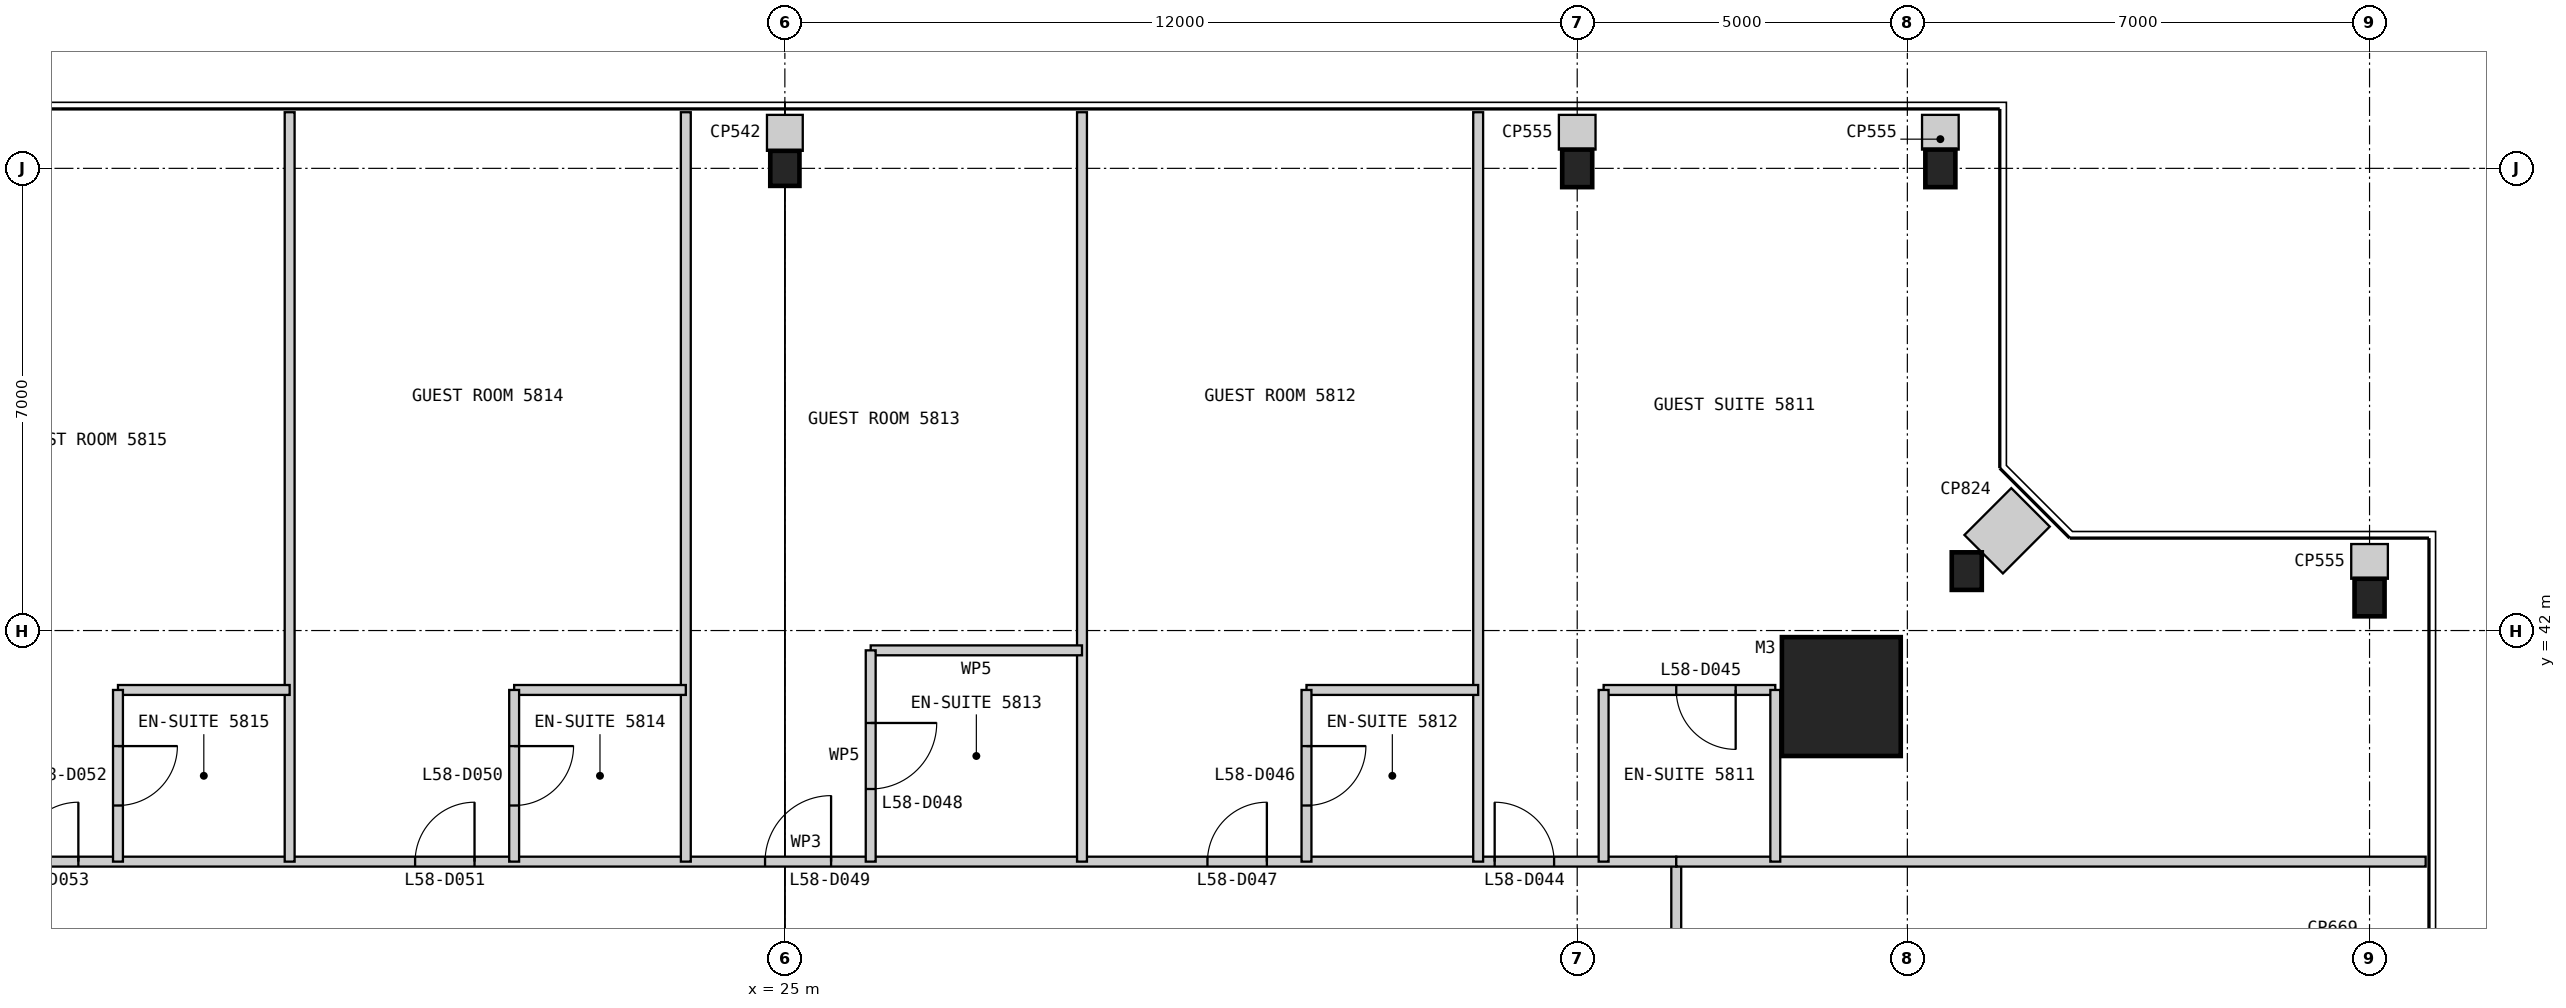
"""IFC4 building model, lengths in metres.
Left out: names, types, materials, properties, quantities, classifications, styles, units other than length and angle.
Written with IfcOpenShell. Run it as: python <this file> out.ifc"""

import sys

from ifc_helpers import new_model, si_unit, direction, frame, frame_2d, origin, origin_2d, place, context, subcontext, project, spatial, rectangle, i_section, extrude, element, fill, save


model = new_model("IFC4")
c1 = context("Model", 3, precision=1e-05, world=origin(), true_north=direction((0.0, 1.0)))
c2 = subcontext(c1, "Body", "Model", "MODEL_VIEW")
j1 = project(units=[si_unit("LENGTHUNIT", "METRE"), si_unit("PLANEANGLEUNIT", "RADIAN")], contexts=[c1])
p1 = place(None, origin())
s1 = spatial("IfcSite", under=j1, at=p1, CompositionType="ELEMENT")
p2 = place(p1, origin())
s2 = spatial("IfcBuilding", under=s1, at=p2, CompositionType="ELEMENT")
p3 = place(p2, frame((0.0, 0.0, 249.2)))
s3 = spatial("IfcBuildingStorey", under=s2, at=p3, CompositionType="ELEMENT", Elevation=249.2)
p4 = place(p3, frame((41.0, 41.0, 0.0), z_axis=(0.0, 0.0, 1.0), x_axis=(1.0, 0.0, 0.0)))
e1 = element("IfcColumn", 1, at=p4, inside=s3, PredefinedType="COLUMN", context=c2, shape_type="SweptSolid", body=[
    extrude(rectangle(XDim=1.8, YDim=1.8, at=origin_2d()), origin(), (0.0, 0.0, 1.0), 3.4),
])
for number, where, z_axis, x_axis in (
    (2, (49.0, 42.5, 0.0), (0.0, 0.0, 1.0), (1.0, 0.0, 0.0)),
    (3, (42.9, 42.9, 0.0), (0.0, 0.0, 1.0), (1.0, 0.0, 0.0)),
    (4, (42.5, 49.0, 0.0), (0.0, 0.0, 1.0), (1.0, 0.0, 0.0)),
    (5, (37.0, 49.0, 0.0), (0.0, 0.0, 1.0), (1.0, 0.0, 0.0)),
):
    element("IfcColumn", number, at=place(p3, frame(where, z_axis=z_axis, x_axis=x_axis)), inside=s3, PredefinedType="COLUMN", context=c2, shape_type="SweptSolid", body=[
        extrude(i_section(OverallWidth=0.455, OverallDepth=0.569, WebThickness=0.078, FlangeThickness=0.125, at=origin_2d()), origin(), (0.0, 0.0, 1.0), 3.4),
    ])
p5 = place(p3, frame((25.0, 49.0, 0.0), z_axis=(0.0, 0.0, 1.0), x_axis=(1.0, 0.0, 0.0)))
e6 = element("IfcColumn", 6, at=p5, inside=s3, PredefinedType="COLUMN", context=c2, shape_type="SweptSolid", body=[
    extrude(i_section(OverallWidth=0.442, OverallDepth=0.531, WebThickness=0.066, FlangeThickness=0.106, at=origin_2d()), origin(), (0.0, 0.0, 1.0), 3.4),
])
p6 = place(p3, frame((38.5, 11.5, 0.0), z_axis=(0.0, 0.0, 1.0), x_axis=(0.0, 1.0, 0.0)))
e7 = element("IfcWall", 7, at=p6, inside=s3, PredefinedType="PARTITIONING", context=c2, shape_type="SweptSolid", body=[
    extrude(rectangle(XDim=27.0, YDim=0.15, at=frame_2d((13.5, 0.0))), origin(), (0.0, 0.0, 1.0), 3.25),
])
p7 = place(p6, frame((1.85, 0.0, 0.0)))
e8 = element("IfcOpeningElement", 8, at=p7, cuts=e7, PredefinedType="OPENING", context=c2, shape_type="SweptSolid", body=[
    extrude(rectangle(XDim=0.9, YDim=2.1, at=frame_2d((0.45, 1.05))), frame((0.0, 0.085, 0.0), z_axis=(0.0, -1.0, 0.0), x_axis=(1.0, 0.0, 0.0)), (0.0, 0.0, 1.0), 0.17),
])
p8 = place(p6, frame((6.2, 0.0, 0.0)))
e9 = element("IfcOpeningElement", 9, at=p8, cuts=e7, PredefinedType="OPENING", context=c2, shape_type="SweptSolid", body=[
    extrude(rectangle(XDim=0.9, YDim=2.1, at=frame_2d((0.45, 1.05))), frame((0.0, 0.085, 0.0), z_axis=(0.0, -1.0, 0.0), x_axis=(1.0, 0.0, 0.0)), (0.0, 0.0, 1.0), 0.17),
])
p9 = place(p6, frame((12.2, 0.0, 0.0)))
e10 = element("IfcOpeningElement", 10, at=p9, cuts=e7, PredefinedType="OPENING", context=c2, shape_type="SweptSolid", body=[
    extrude(rectangle(XDim=0.9, YDim=2.1, at=frame_2d((0.45, 1.05))), frame((0.0, 0.085, 0.0), z_axis=(0.0, -1.0, 0.0), x_axis=(1.0, 0.0, 0.0)), (0.0, 0.0, 1.0), 0.17),
])
p10 = place(p6, frame((18.2, 0.0, 0.0)))
e11 = element("IfcOpeningElement", 11, at=p10, cuts=e7, PredefinedType="OPENING", context=c2, shape_type="SweptSolid", body=[
    extrude(rectangle(XDim=0.9, YDim=2.1, at=frame_2d((0.45, 1.05))), frame((0.0, 0.085, 0.0), z_axis=(0.0, -1.0, 0.0), x_axis=(1.0, 0.0, 0.0)), (0.0, 0.0, 1.0), 0.17),
])
p11 = place(p6, frame((24.2, 0.0, 0.0)))
e12 = element("IfcOpeningElement", 12, at=p11, cuts=e7, PredefinedType="OPENING", context=c2, shape_type="SweptSolid", body=[
    extrude(rectangle(XDim=0.9, YDim=2.1, at=frame_2d((0.45, 1.05))), frame((0.0, 0.085, 0.0), z_axis=(0.0, -1.0, 0.0), x_axis=(1.0, 0.0, 0.0)), (0.0, 0.0, 1.0), 0.17),
])
p12 = place(p3, frame((38.5, 38.5, 0.0), z_axis=(0.0, 0.0, 1.0), x_axis=(-1.0, 0.0, 0.0)))
e13 = element("IfcWall", 13, at=p12, inside=s3, PredefinedType="PARTITIONING", context=c2, shape_type="SweptSolid", body=[
    extrude(rectangle(XDim=27.0, YDim=0.15, at=frame_2d((13.5, 0.0))), origin(), (0.0, 0.0, 1.0), 3.25),
])
p13 = place(p12, frame((1.85, 0.0, 0.0)))
e14 = element("IfcOpeningElement", 14, at=p13, cuts=e13, PredefinedType="OPENING", context=c2, shape_type="SweptSolid", body=[
    extrude(rectangle(XDim=0.9, YDim=2.1, at=frame_2d((0.45, 1.05))), frame((0.0, 0.085, 0.0), z_axis=(0.0, -1.0, 0.0), x_axis=(1.0, 0.0, 0.0)), (0.0, 0.0, 1.0), 0.17),
])
p14 = place(p12, frame((6.2, 0.0, 0.0)))
e15 = element("IfcOpeningElement", 15, at=p14, cuts=e13, PredefinedType="OPENING", context=c2, shape_type="SweptSolid", body=[
    extrude(rectangle(XDim=0.9, YDim=2.1, at=frame_2d((0.45, 1.05))), frame((0.0, 0.085, 0.0), z_axis=(0.0, -1.0, 0.0), x_axis=(1.0, 0.0, 0.0)), (0.0, 0.0, 1.0), 0.17),
])
p15 = place(p12, frame((12.8, 0.0, 0.0)))
e16 = element("IfcOpeningElement", 16, at=p15, cuts=e13, PredefinedType="OPENING", context=c2, shape_type="SweptSolid", body=[
    extrude(rectangle(XDim=1.0, YDim=2.1, at=frame_2d((0.5, 1.05))), frame((0.0, 0.085, 0.0), z_axis=(0.0, -1.0, 0.0), x_axis=(1.0, 0.0, 0.0)), (0.0, 0.0, 1.0), 0.17),
])
p16 = place(p12, frame((18.2, 0.0, 0.0)))
e17 = element("IfcOpeningElement", 17, at=p16, cuts=e13, PredefinedType="OPENING", context=c2, shape_type="SweptSolid", body=[
    extrude(rectangle(XDim=0.9, YDim=2.1, at=frame_2d((0.45, 1.05))), frame((0.0, 0.085, 0.0), z_axis=(0.0, -1.0, 0.0), x_axis=(1.0, 0.0, 0.0)), (0.0, 0.0, 1.0), 0.17),
])
p17 = place(p12, frame((24.2, 0.0, 0.0)))
e18 = element("IfcOpeningElement", 18, at=p17, cuts=e13, PredefinedType="OPENING", context=c2, shape_type="SweptSolid", body=[
    extrude(rectangle(XDim=0.9, YDim=2.1, at=frame_2d((0.45, 1.05))), frame((0.0, 0.085, 0.0), z_axis=(0.0, -1.0, 0.0), x_axis=(1.0, 0.0, 0.0)), (0.0, 0.0, 1.0), 0.17),
])
p18 = place(p3, frame((49.85, 38.5, 0.0), z_axis=(0.0, 0.0, 1.0), x_axis=(-1.0, 0.0, 0.0)))
e19 = element("IfcWall", 19, at=p18, inside=s3, PredefinedType="PARTITIONING", context=c2, shape_type="SweptSolid", body=[
    extrude(rectangle(XDim=11.35, YDim=0.15, at=frame_2d((5.675, 0.0))), origin(), (0.0, 0.0, 1.0), 3.25),
])
p19 = place(p3, frame((40.0, 41.1, 0.0), z_axis=(0.0, 0.0, 1.0), x_axis=(-1.0, 0.0, 0.0)))
e20 = element("IfcWall", 20, at=p19, inside=s3, PredefinedType="PARTITIONING", context=c2, shape_type="SweptSolid", body=[
    extrude(rectangle(XDim=2.6, YDim=0.15, at=frame_2d((1.3, 0.0))), origin(), (0.0, 0.0, 1.0), 2.638),
])
p20 = place(p19, frame((0.6, 0.0, 0.0)))
e21 = element("IfcOpeningElement", 21, at=p20, cuts=e20, PredefinedType="OPENING", context=c2, shape_type="SweptSolid", body=[
    extrude(rectangle(XDim=0.9, YDim=2.1, at=frame_2d((0.45, 1.05))), frame((0.0, 0.085, 0.0), z_axis=(0.0, -1.0, 0.0), x_axis=(1.0, 0.0, 0.0)), (0.0, 0.0, 1.0), 0.17),
])
for number, where, z_axis, x_axis in (
    (22, (40.0, 41.1, 0.0), (0.0, 0.0, 1.0), (0.0, -1.0, 0.0)),
    (23, (37.4, 41.1, 0.0), (0.0, 0.0, 1.0), (0.0, -1.0, 0.0)),
):
    element("IfcWall", number, at=place(p3, frame(where, z_axis=z_axis, x_axis=x_axis)), inside=s3, PredefinedType="PARTITIONING", context=c2, shape_type="SweptSolid", body=[
        extrude(rectangle(XDim=2.6, YDim=0.15, at=frame_2d((1.3, 0.0))), origin(), (0.0, 0.0, 1.0), 3.25),
    ])
p21 = place(p3, frame((35.5, 49.85, 0.0), z_axis=(0.0, 0.0, 1.0), x_axis=(0.0, -1.0, 0.0)))
e24 = element("IfcWall", 24, at=p21, inside=s3, PredefinedType="PARTITIONING", context=c2, shape_type="SweptSolid", body=[
    extrude(rectangle(XDim=11.35, YDim=0.15, at=frame_2d((5.675, 0.0))), origin(), (0.0, 0.0, 1.0), 3.25),
])
p22 = place(p3, frame((35.5, 41.1, 0.0), z_axis=(0.0, 0.0, 1.0), x_axis=(-1.0, 0.0, 0.0)))
e25 = element("IfcWall", 25, at=p22, inside=s3, PredefinedType="PARTITIONING", context=c2, shape_type="SweptSolid", body=[
    extrude(rectangle(XDim=2.6, YDim=0.15, at=frame_2d((1.3, 0.0))), origin(), (0.0, 0.0, 1.0), 3.25),
])
p23 = place(p3, frame((32.9, 41.1, 0.0), z_axis=(0.0, 0.0, 1.0), x_axis=(0.0, -1.0, 0.0)))
e26 = element("IfcWall", 26, at=p23, inside=s3, PredefinedType="PARTITIONING", context=c2, shape_type="SweptSolid", body=[
    extrude(rectangle(XDim=2.6, YDim=0.15, at=frame_2d((1.3, 0.0))), origin(), (0.0, 0.0, 1.0), 3.25),
])
p24 = place(p23, frame((0.85, 0.0, 0.0)))
e27 = element("IfcOpeningElement", 27, at=p24, cuts=e26, PredefinedType="OPENING", context=c2, shape_type="SweptSolid", body=[
    extrude(rectangle(XDim=0.9, YDim=2.1, at=frame_2d((0.45, 1.05))), frame((0.0, 0.085, 0.0), z_axis=(0.0, -1.0, 0.0), x_axis=(1.0, 0.0, 0.0)), (0.0, 0.0, 1.0), 0.17),
])
p25 = place(p3, frame((29.5, 49.85, 0.0), z_axis=(0.0, 0.0, 1.0), x_axis=(0.0, -1.0, 0.0)))
e28 = element("IfcWall", 28, at=p25, inside=s3, PredefinedType="PARTITIONING", context=c2, shape_type="SweptSolid", body=[
    extrude(rectangle(XDim=11.35, YDim=0.15, at=frame_2d((5.675, 0.0))), origin(), (0.0, 0.0, 1.0), 3.25),
])
p26 = place(p3, frame((29.5, 41.7, 0.0), z_axis=(0.0, 0.0, 1.0), x_axis=(-1.0, 0.0, 0.0)))
e29 = element("IfcWall", 29, at=p26, inside=s3, PredefinedType="PARTITIONING", context=c2, shape_type="SweptSolid", body=[
    extrude(rectangle(XDim=3.2, YDim=0.15, at=frame_2d((1.6, 0.0))), origin(), (0.0, 0.0, 1.0), 3.25),
])
p27 = place(p3, frame((26.3, 41.7, 0.0), z_axis=(0.0, 0.0, 1.0), x_axis=(0.0, -1.0, 0.0)))
e30 = element("IfcWall", 30, at=p27, inside=s3, PredefinedType="PARTITIONING", context=c2, shape_type="SweptSolid", body=[
    extrude(rectangle(XDim=3.2, YDim=0.15, at=frame_2d((1.6, 0.0))), origin(), (0.0, 0.0, 1.0), 3.25),
])
p28 = place(p27, frame((1.1, 0.0, 0.0)))
e31 = element("IfcOpeningElement", 31, at=p28, cuts=e30, PredefinedType="OPENING", context=c2, shape_type="SweptSolid", body=[
    extrude(rectangle(XDim=1.0, YDim=2.1, at=frame_2d((0.5, 1.05))), frame((0.0, 0.085, 0.0), z_axis=(0.0, -1.0, 0.0), x_axis=(1.0, 0.0, 0.0)), (0.0, 0.0, 1.0), 0.17),
])
p29 = place(p3, frame((23.5, 49.85, 0.0), z_axis=(0.0, 0.0, 1.0), x_axis=(0.0, -1.0, 0.0)))
e32 = element("IfcWall", 32, at=p29, inside=s3, PredefinedType="PARTITIONING", context=c2, shape_type="SweptSolid", body=[
    extrude(rectangle(XDim=11.35, YDim=0.15, at=frame_2d((5.675, 0.0))), origin(), (0.0, 0.0, 1.0), 3.25),
])
p30 = place(p3, frame((23.5, 41.1, 0.0), z_axis=(0.0, 0.0, 1.0), x_axis=(-1.0, 0.0, 0.0)))
e33 = element("IfcWall", 33, at=p30, inside=s3, PredefinedType="PARTITIONING", context=c2, shape_type="SweptSolid", body=[
    extrude(rectangle(XDim=2.6, YDim=0.15, at=frame_2d((1.3, 0.0))), origin(), (0.0, 0.0, 1.0), 3.25),
])
p31 = place(p3, frame((20.9, 41.1, 0.0), z_axis=(0.0, 0.0, 1.0), x_axis=(0.0, -1.0, 0.0)))
e34 = element("IfcWall", 34, at=p31, inside=s3, PredefinedType="PARTITIONING", context=c2, shape_type="SweptSolid", body=[
    extrude(rectangle(XDim=2.6, YDim=0.15, at=frame_2d((1.3, 0.0))), origin(), (0.0, 0.0, 1.0), 3.25),
])
p32 = place(p31, frame((0.85, 0.0, 0.0)))
e35 = element("IfcOpeningElement", 35, at=p32, cuts=e34, PredefinedType="OPENING", context=c2, shape_type="SweptSolid", body=[
    extrude(rectangle(XDim=0.9, YDim=2.1, at=frame_2d((0.45, 1.05))), frame((0.0, 0.085, 0.0), z_axis=(0.0, -1.0, 0.0), x_axis=(1.0, 0.0, 0.0)), (0.0, 0.0, 1.0), 0.17),
])
p33 = place(p3, frame((17.5, 49.85, 0.0), z_axis=(0.0, 0.0, 1.0), x_axis=(0.0, -1.0, 0.0)))
e36 = element("IfcWall", 36, at=p33, inside=s3, PredefinedType="PARTITIONING", context=c2, shape_type="SweptSolid", body=[
    extrude(rectangle(XDim=11.35, YDim=0.15, at=frame_2d((5.675, 0.0))), origin(), (0.0, 0.0, 1.0), 3.25),
])
p34 = place(p3, frame((17.5, 41.1, 0.0), z_axis=(0.0, 0.0, 1.0), x_axis=(-1.0, 0.0, 0.0)))
e37 = element("IfcWall", 37, at=p34, inside=s3, PredefinedType="PARTITIONING", context=c2, shape_type="SweptSolid", body=[
    extrude(rectangle(XDim=2.6, YDim=0.15, at=frame_2d((1.3, 0.0))), origin(), (0.0, 0.0, 1.0), 3.25),
])
p35 = place(p3, frame((14.9, 41.1, 0.0), z_axis=(0.0, 0.0, 1.0), x_axis=(0.0, -1.0, 0.0)))
e38 = element("IfcWall", 38, at=p35, inside=s3, PredefinedType="PARTITIONING", context=c2, shape_type="SweptSolid", body=[
    extrude(rectangle(XDim=2.6, YDim=0.15, at=frame_2d((1.3, 0.0))), origin(), (0.0, 0.0, 1.0), 3.25),
])
p36 = place(p35, frame((0.85, 0.0, 0.0)))
e39 = element("IfcOpeningElement", 39, at=p36, cuts=e38, PredefinedType="OPENING", context=c2, shape_type="SweptSolid", body=[
    extrude(rectangle(XDim=0.9, YDim=2.1, at=frame_2d((0.45, 1.05))), frame((0.0, 0.085, 0.0), z_axis=(0.0, -1.0, 0.0), x_axis=(1.0, 0.0, 0.0)), (0.0, 0.0, 1.0), 0.17),
])
p37 = place(p3, frame((49.0, 43.31, 0.0), z_axis=(0.0, 0.0, 1.0), x_axis=(0.0, -1.0, 0.0)))
e40 = element("IfcWall", 40, at=p37, inside=s3, PredefinedType="PARTITIONING", context=c2, shape_type="SweptSolid", body=[
    extrude(rectangle(XDim=0.526, YDim=0.555, at=frame_2d((0.263, 0.0))), origin(), (0.0, 0.0, 1.0), 3.25),
])
p38 = place(p3, frame((43.866, 43.866, 0.0), z_axis=(0.0, 0.0, 1.0), x_axis=(-0.707106781187, -0.707106781187, 0.0)))
e41 = element("IfcWall", 41, at=p38, inside=s3, PredefinedType="PARTITIONING", context=c2, shape_type="SweptSolid", body=[
    extrude(rectangle(XDim=1.004, YDim=0.824, at=frame_2d((0.502, 0.0))), origin(), (0.0, 0.0, 1.0), 3.25),
])
for number, where, z_axis, x_axis in (
    (42, (42.5, 49.81, 0.0), (0.0, 0.0, 1.0), (0.0, -1.0, 0.0)),
    (43, (37.0, 49.81, 0.0), (0.0, 0.0, 1.0), (0.0, -1.0, 0.0)),
):
    element("IfcWall", number, at=place(p3, frame(where, z_axis=z_axis, x_axis=x_axis)), inside=s3, PredefinedType="PARTITIONING", context=c2, shape_type="SweptSolid", body=[
        extrude(rectangle(XDim=0.526, YDim=0.555, at=frame_2d((0.263, 0.0))), origin(), (0.0, 0.0, 1.0), 3.25),
    ])
p39 = place(p3, frame((25.0, 49.81, 0.0), z_axis=(0.0, 0.0, 1.0), x_axis=(0.0, -1.0, 0.0)))
e44 = element("IfcWall", 44, at=p39, inside=s3, PredefinedType="PARTITIONING", context=c2, shape_type="SweptSolid", body=[
    extrude(rectangle(XDim=0.545, YDim=0.542, at=frame_2d((0.272, 0.0))), origin(), (0.0, 0.0, 1.0), 3.25),
])
p40 = place(p13, frame((0.9, 0.0, 0.0), z_axis=(0.0, 0.0, 1.0), x_axis=(-1.0, 0.0, 0.0)))
e45 = element("IfcDoor", 45, at=p40, inside=s3, OperationType="SINGLE_SWING_LEFT", PredefinedType="DOOR", context=c2, shape_type="SweptSolid", body=[
    extrude(rectangle(XDim=0.9, YDim=2.1, at=frame_2d((0.45, 1.05))), frame((0.0, 0.025, 0.0), z_axis=(0.0, -1.0, 0.0), x_axis=(1.0, 0.0, 0.0)), (0.0, 0.0, 1.0), 0.05),
])
fill(e14, e45)
p41 = place(p20, origin())
e46 = element("IfcDoor", 46, at=p41, inside=s3, OperationType="SINGLE_SWING_LEFT", PredefinedType="DOOR", context=c2, shape_type="SweptSolid", body=[
    extrude(rectangle(XDim=0.9, YDim=2.1, at=frame_2d((0.45, 1.05))), frame((0.0, 0.025, 0.0), z_axis=(0.0, -1.0, 0.0), x_axis=(1.0, 0.0, 0.0)), (0.0, 0.0, 1.0), 0.05),
])
fill(e21, e46)
p42 = place(p24, origin())
e47 = element("IfcDoor", 47, at=p42, inside=s3, OperationType="SINGLE_SWING_LEFT", PredefinedType="DOOR", context=c2, shape_type="SweptSolid", body=[
    extrude(rectangle(XDim=0.9, YDim=2.1, at=frame_2d((0.45, 1.05))), frame((0.0, 0.025, 0.0), z_axis=(0.0, -1.0, 0.0), x_axis=(1.0, 0.0, 0.0)), (0.0, 0.0, 1.0), 0.05),
])
fill(e27, e47)
p43 = place(p14, frame((0.9, 0.0, 0.0), z_axis=(0.0, 0.0, 1.0), x_axis=(-1.0, 0.0, 0.0)))
e48 = element("IfcDoor", 48, at=p43, inside=s3, OperationType="SINGLE_SWING_RIGHT", PredefinedType="DOOR", context=c2, shape_type="SweptSolid", body=[
    extrude(rectangle(XDim=0.9, YDim=2.1, at=frame_2d((0.45, 1.05))), frame((0.0, 0.025, 0.0), z_axis=(0.0, -1.0, 0.0), x_axis=(1.0, 0.0, 0.0)), (0.0, 0.0, 1.0), 0.05),
])
fill(e15, e48)
p44 = place(p28, origin())
e49 = element("IfcDoor", 49, at=p44, inside=s3, OperationType="SINGLE_SWING_LEFT", PredefinedType="DOOR", context=c2, shape_type="SweptSolid", body=[
    extrude(rectangle(XDim=1.0, YDim=2.1, at=frame_2d((0.5, 1.05))), frame((0.0, 0.025, 0.0), z_axis=(0.0, -1.0, 0.0), x_axis=(1.0, 0.0, 0.0)), (0.0, 0.0, 1.0), 0.05),
])
fill(e31, e49)
p45 = place(p15, frame((1.0, 0.0, 0.0), z_axis=(0.0, 0.0, 1.0), x_axis=(-1.0, 0.0, 0.0)))
e50 = element("IfcDoor", 50, at=p45, inside=s3, OperationType="SINGLE_SWING_RIGHT", PredefinedType="DOOR", context=c2, shape_type="SweptSolid", body=[
    extrude(rectangle(XDim=1.0, YDim=2.1, at=frame_2d((0.5, 1.05))), frame((0.0, 0.025, 0.0), z_axis=(0.0, -1.0, 0.0), x_axis=(1.0, 0.0, 0.0)), (0.0, 0.0, 1.0), 0.05),
])
fill(e16, e50)
p46 = place(p32, origin())
e51 = element("IfcDoor", 51, at=p46, inside=s3, OperationType="SINGLE_SWING_LEFT", PredefinedType="DOOR", context=c2, shape_type="SweptSolid", body=[
    extrude(rectangle(XDim=0.9, YDim=2.1, at=frame_2d((0.45, 1.05))), frame((0.0, 0.025, 0.0), z_axis=(0.0, -1.0, 0.0), x_axis=(1.0, 0.0, 0.0)), (0.0, 0.0, 1.0), 0.05),
])
fill(e35, e51)
p47 = place(p16, frame((0.9, 0.0, 0.0), z_axis=(0.0, 0.0, 1.0), x_axis=(-1.0, 0.0, 0.0)))
e52 = element("IfcDoor", 52, at=p47, inside=s3, OperationType="SINGLE_SWING_RIGHT", PredefinedType="DOOR", context=c2, shape_type="SweptSolid", body=[
    extrude(rectangle(XDim=0.9, YDim=2.1, at=frame_2d((0.45, 1.05))), frame((0.0, 0.025, 0.0), z_axis=(0.0, -1.0, 0.0), x_axis=(1.0, 0.0, 0.0)), (0.0, 0.0, 1.0), 0.05),
])
fill(e17, e52)
p48 = place(p36, origin())
e53 = element("IfcDoor", 53, at=p48, inside=s3, OperationType="SINGLE_SWING_LEFT", PredefinedType="DOOR", context=c2, shape_type="SweptSolid", body=[
    extrude(rectangle(XDim=0.9, YDim=2.1, at=frame_2d((0.45, 1.05))), frame((0.0, 0.025, 0.0), z_axis=(0.0, -1.0, 0.0), x_axis=(1.0, 0.0, 0.0)), (0.0, 0.0, 1.0), 0.05),
])
fill(e39, e53)
p49 = place(p17, frame((0.9, 0.0, 0.0), z_axis=(0.0, 0.0, 1.0), x_axis=(-1.0, 0.0, 0.0)))
e54 = element("IfcDoor", 54, at=p49, inside=s3, OperationType="SINGLE_SWING_RIGHT", PredefinedType="DOOR", context=c2, shape_type="SweptSolid", body=[
    extrude(rectangle(XDim=0.9, YDim=2.1, at=frame_2d((0.45, 1.05))), frame((0.0, 0.025, 0.0), z_axis=(0.0, -1.0, 0.0), x_axis=(1.0, 0.0, 0.0)), (0.0, 0.0, 1.0), 0.05),
])
fill(e18, e54)
save(model, sys.argv[1])
